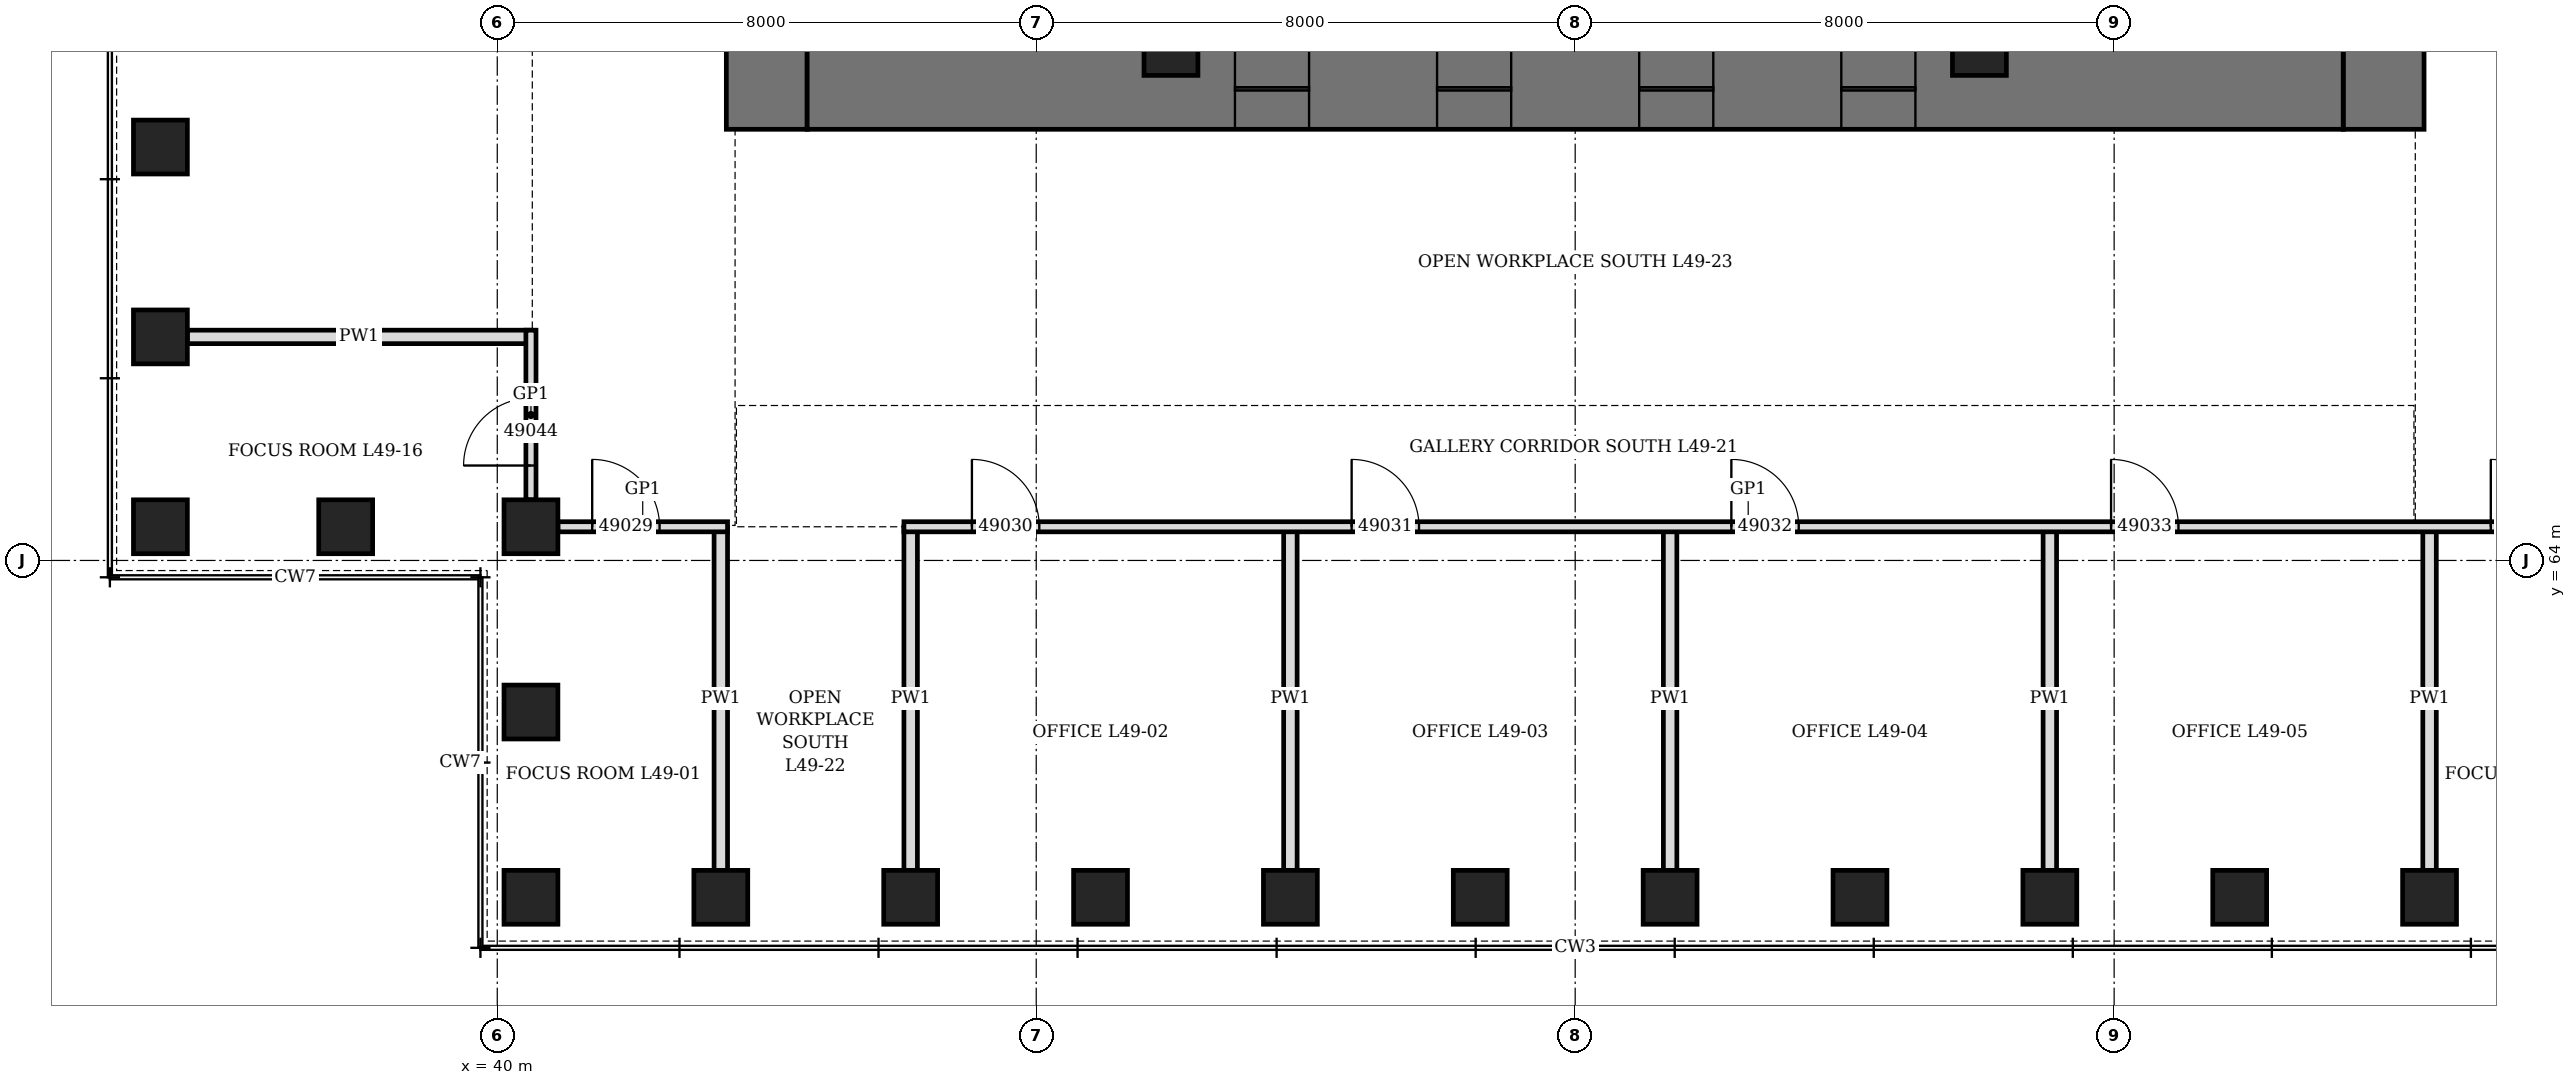
"""IFC4 building model, lengths in metres.
Left out: names, types, materials, properties, quantities, classifications, styles, units other than length and angle.
Written with IfcOpenShell. Run it as: python <this file> out.ifc"""

import sys

from ifc_helpers import new_model, si_unit, direction, frame, frame_2d, origin, origin_2d, place, context, subcontext, project, spatial, rectangle, hollow_rectangle, extrude, element, fill, save


model = new_model("IFC4")
c1 = context("Model", 3, precision=1e-05, world=origin(), true_north=direction((0.0, 1.0)))
c2 = subcontext(c1, "Body", "Model", "MODEL_VIEW")
j1 = project(units=[si_unit("LENGTHUNIT", "METRE"), si_unit("PLANEANGLEUNIT", "RADIAN")], contexts=[c1])
p1 = place(None, origin())
s1 = spatial("IfcSite", under=j1, at=p1, CompositionType="ELEMENT")
p2 = place(p1, origin())
s2 = spatial("IfcBuilding", under=s1, at=p2, CompositionType="ELEMENT")
p3 = place(p2, frame((0.0, 0.0, 219.1)))
s3 = spatial("IfcBuildingStorey", under=s2, at=p3, CompositionType="ELEMENT", Elevation=219.1)
for number, where, z_axis, x_axis in (
    (1, (40.5, 59.0, 0.0), (0.0, 0.0, 1.0), (1.0, 0.0, 0.0)),
    (2, (43.318, 59.0, 0.0), (0.0, 0.0, 1.0), (1.0, 0.0, 0.0)),
    (3, (46.136, 59.0, 0.0), (0.0, 0.0, 1.0), (1.0, 0.0, 0.0)),
    (4, (48.955, 59.0, 0.0), (0.0, 0.0, 1.0), (1.0, 0.0, 0.0)),
    (5, (51.773, 59.0, 0.0), (0.0, 0.0, 1.0), (1.0, 0.0, 0.0)),
    (6, (54.591, 59.0, 0.0), (0.0, 0.0, 1.0), (1.0, 0.0, 0.0)),
    (7, (57.409, 59.0, 0.0), (0.0, 0.0, 1.0), (1.0, 0.0, 0.0)),
    (8, (60.227, 59.0, 0.0), (0.0, 0.0, 1.0), (1.0, 0.0, 0.0)),
    (9, (63.045, 59.0, 0.0), (0.0, 0.0, 1.0), (1.0, 0.0, 0.0)),
    (10, (65.864, 59.0, 0.0), (0.0, 0.0, 1.0), (1.0, 0.0, 0.0)),
    (11, (68.682, 59.0, 0.0), (0.0, 0.0, 1.0), (1.0, 0.0, 0.0)),
    (12, (35.0, 70.136, 0.0), (0.0, 0.0, 1.0), (0.0, 1.0, 0.0)),
    (13, (35.0, 67.318, 0.0), (0.0, 0.0, 1.0), (0.0, 1.0, 0.0)),
    (14, (35.0, 64.5, 0.0), (0.0, 0.0, 1.0), (1.0, 0.0, 0.0)),
    (15, (37.75, 64.5, 0.0), (0.0, 0.0, 1.0), (1.0, 0.0, 0.0)),
    (16, (40.5, 64.5, 0.0), (0.0, 0.0, 1.0), (0.0, 1.0, 0.0)),
    (17, (40.5, 61.75, 0.0), (0.0, 0.0, 1.0), (0.0, 1.0, 0.0)),
):
    element("IfcColumn", number, at=place(p3, frame(where, z_axis=z_axis, x_axis=x_axis)), inside=s3, PredefinedType="COLUMN", context=c2, shape_type="SweptSolid", body=[
        extrude(hollow_rectangle(XDim=0.8, YDim=0.8, WallThickness=0.08, at=origin_2d()), origin(), (0.0, 0.0, 1.0), 4.2),
    ])
p4 = place(p3, frame((44.0, 70.4, 0.0), z_axis=(0.0, 0.0, 1.0), x_axis=(0.0, 1.0, 0.0)))
e18 = element("IfcWall", 18, at=p4, inside=s3, PredefinedType="SHEAR", context=c2, shape_type="SweptSolid", body=[
    extrude(rectangle(XDim=19.2, YDim=1.2, at=frame_2d((9.6, 0.0))), origin(), (0.0, 0.0, 1.0), 4.2),
])
p5 = place(p4, frame((8.6, 0.0, 0.0)))
e19 = element("IfcOpeningElement", 19, at=p5, cuts=e18, PredefinedType="OPENING", context=c2, shape_type="SweptSolid", body=[
    extrude(rectangle(XDim=2.0, YDim=2.4, at=frame_2d((1.0, 1.2))), frame((0.0, 0.61, 0.0), z_axis=(0.0, -1.0, 0.0), x_axis=(1.0, 0.0, 0.0)), (0.0, 0.0, 1.0), 1.22),
])
p6 = place(p3, frame((68.0, 70.4, 0.0), z_axis=(0.0, 0.0, 1.0), x_axis=(0.0, 1.0, 0.0)))
e20 = element("IfcWall", 20, at=p6, inside=s3, PredefinedType="SHEAR", context=c2, shape_type="SweptSolid", body=[
    extrude(rectangle(XDim=19.2, YDim=1.2, at=frame_2d((9.6, 0.0))), origin(), (0.0, 0.0, 1.0), 4.2),
])
p7 = place(p6, frame((8.6, 0.0, 0.0)))
e21 = element("IfcOpeningElement", 21, at=p7, cuts=e20, PredefinedType="OPENING", context=c2, shape_type="SweptSolid", body=[
    extrude(rectangle(XDim=2.0, YDim=2.4, at=frame_2d((1.0, 1.2))), frame((0.0, 0.61, 0.0), z_axis=(0.0, -1.0, 0.0), x_axis=(1.0, 0.0, 0.0)), (0.0, 0.0, 1.0), 1.22),
])
p8 = place(p3, frame((44.6, 71.0, 0.0), z_axis=(0.0, 0.0, 1.0), x_axis=(1.0, 0.0, 0.0)))
e22 = element("IfcWall", 22, at=p8, inside=s3, PredefinedType="SHEAR", context=c2, shape_type="SweptSolid", body=[
    extrude(rectangle(XDim=22.8, YDim=1.2, at=frame_2d((11.4, 0.0))), origin(), (0.0, 0.0, 1.0), 4.2),
])
p9 = place(p8, frame((6.35, 0.0, 0.0)))
e23 = element("IfcOpeningElement", 23, at=p9, cuts=e22, PredefinedType="OPENING", context=c2, shape_type="SweptSolid", body=[
    extrude(rectangle(XDim=1.1, YDim=2.2, at=frame_2d((0.55, 1.1))), frame((0.0, 0.61, 0.0), z_axis=(0.0, -1.0, 0.0), x_axis=(1.0, 0.0, 0.0)), (0.0, 0.0, 1.0), 1.22),
])
p10 = place(p8, frame((9.35, 0.0, 0.0)))
e24 = element("IfcOpeningElement", 24, at=p10, cuts=e22, PredefinedType="OPENING", context=c2, shape_type="SweptSolid", body=[
    extrude(rectangle(XDim=1.1, YDim=2.2, at=frame_2d((0.55, 1.1))), frame((0.0, 0.61, 0.0), z_axis=(0.0, -1.0, 0.0), x_axis=(1.0, 0.0, 0.0)), (0.0, 0.0, 1.0), 1.22),
])
p11 = place(p8, frame((12.35, 0.0, 0.0)))
e25 = element("IfcOpeningElement", 25, at=p11, cuts=e22, PredefinedType="OPENING", context=c2, shape_type="SweptSolid", body=[
    extrude(rectangle(XDim=1.1, YDim=2.2, at=frame_2d((0.55, 1.1))), frame((0.0, 0.61, 0.0), z_axis=(0.0, -1.0, 0.0), x_axis=(1.0, 0.0, 0.0)), (0.0, 0.0, 1.0), 1.22),
])
p12 = place(p8, frame((15.35, 0.0, 0.0)))
e26 = element("IfcOpeningElement", 26, at=p12, cuts=e22, PredefinedType="OPENING", context=c2, shape_type="SweptSolid", body=[
    extrude(rectangle(XDim=1.1, YDim=2.2, at=frame_2d((0.55, 1.1))), frame((0.0, 0.61, 0.0), z_axis=(0.0, -1.0, 0.0), x_axis=(1.0, 0.0, 0.0)), (0.0, 0.0, 1.0), 1.22),
])
for number, where, z_axis, x_axis in (
    (27, (50.0, 71.6, 0.0), (0.0, 0.0, 1.0), (1.0, 0.0, 0.0)),
    (28, (62.0, 71.6, 0.0), (0.0, 0.0, 1.0), (1.0, 0.0, 0.0)),
):
    element("IfcColumn", number, at=place(p3, frame(where, z_axis=z_axis, x_axis=x_axis)), inside=s3, PredefinedType="COLUMN", context=c2, shape_type="SweptSolid", body=[
        extrude(hollow_rectangle(XDim=0.8, YDim=0.8, WallThickness=0.1, at=origin_2d()), origin(), (0.0, 0.0, 1.0), 4.2),
    ])
for number, where, z_axis, x_axis in (
    (29, (43.318, 59.4, 0.0), (0.0, 0.0, 1.0), (0.0, 1.0, 0.0)),
    (30, (46.136, 59.4, 0.0), (0.0, 0.0, 1.0), (0.0, 1.0, 0.0)),
    (31, (51.773, 59.4, 0.0), (0.0, 0.0, 1.0), (0.0, 1.0, 0.0)),
    (32, (57.409, 59.4, 0.0), (0.0, 0.0, 1.0), (0.0, 1.0, 0.0)),
    (33, (63.045, 59.4, 0.0), (0.0, 0.0, 1.0), (0.0, 1.0, 0.0)),
    (34, (68.682, 59.4, 0.0), (0.0, 0.0, 1.0), (0.0, 1.0, 0.0)),
    (35, (35.4, 67.318, 0.0), (0.0, 0.0, 1.0), (1.0, 0.0, 0.0)),
):
    element("IfcWall", number, at=place(p3, frame(where, z_axis=z_axis, x_axis=x_axis)), inside=s3, PredefinedType="PARTITIONING", context=c2, shape_type="SweptSolid", body=[
        extrude(rectangle(XDim=5.1, YDim=0.2, at=frame_2d((2.55, 0.0))), origin(), (0.0, 0.0, 1.0), 3.428),
    ])
p13 = place(p3, frame((40.9, 64.5, 0.0), z_axis=(0.0, 0.0, 1.0), x_axis=(1.0, 0.0, 0.0)))
e36 = element("IfcWall", 36, at=p13, inside=s3, PredefinedType="PARTITIONING", context=c2, shape_type="SweptSolid", body=[
    extrude(rectangle(XDim=2.518, YDim=0.15, at=frame_2d((1.259, 0.0))), origin(), (0.0, 0.0, 1.0), 4.04),
])
p14 = place(p13, frame((0.509, 0.0, 0.0)))
e37 = element("IfcOpeningElement", 37, at=p14, cuts=e36, PredefinedType="OPENING", context=c2, shape_type="SweptSolid", body=[
    extrude(rectangle(XDim=1.0, YDim=2.4, at=frame_2d((0.5, 1.2))), frame((0.0, 0.085, 0.0), z_axis=(0.0, -1.0, 0.0), x_axis=(1.0, 0.0, 0.0)), (0.0, 0.0, 1.0), 0.17),
])
p15 = place(p3, frame((46.036, 64.5, 0.0), z_axis=(0.0, 0.0, 1.0), x_axis=(1.0, 0.0, 0.0)))
e38 = element("IfcWall", 38, at=p15, inside=s3, PredefinedType="PARTITIONING", context=c2, shape_type="SweptSolid", body=[
    extrude(rectangle(XDim=25.064, YDim=0.15, at=frame_2d((12.532, 0.0))), origin(), (0.0, 0.0, 1.0), 4.04),
])
p16 = place(p15, frame((1.009, 0.0, 0.0)))
e39 = element("IfcOpeningElement", 39, at=p16, cuts=e38, PredefinedType="OPENING", context=c2, shape_type="SweptSolid", body=[
    extrude(rectangle(XDim=1.0, YDim=2.1, at=frame_2d((0.5, 1.05))), frame((0.0, 0.085, 0.0), z_axis=(0.0, -1.0, 0.0), x_axis=(1.0, 0.0, 0.0)), (0.0, 0.0, 1.0), 0.17),
])
p17 = place(p15, frame((6.646, 0.0, 0.0)))
e40 = element("IfcOpeningElement", 40, at=p17, cuts=e38, PredefinedType="OPENING", context=c2, shape_type="SweptSolid", body=[
    extrude(rectangle(XDim=1.0, YDim=2.1, at=frame_2d((0.5, 1.05))), frame((0.0, 0.085, 0.0), z_axis=(0.0, -1.0, 0.0), x_axis=(1.0, 0.0, 0.0)), (0.0, 0.0, 1.0), 0.17),
])
p18 = place(p15, frame((12.282, 0.0, 0.0)))
e41 = element("IfcOpeningElement", 41, at=p18, cuts=e38, PredefinedType="OPENING", context=c2, shape_type="SweptSolid", body=[
    extrude(rectangle(XDim=1.0, YDim=2.1, at=frame_2d((0.5, 1.05))), frame((0.0, 0.085, 0.0), z_axis=(0.0, -1.0, 0.0), x_axis=(1.0, 0.0, 0.0)), (0.0, 0.0, 1.0), 0.17),
])
p19 = place(p15, frame((17.918, 0.0, 0.0)))
e42 = element("IfcOpeningElement", 42, at=p19, cuts=e38, PredefinedType="OPENING", context=c2, shape_type="SweptSolid", body=[
    extrude(rectangle(XDim=1.0, YDim=2.1, at=frame_2d((0.5, 1.05))), frame((0.0, 0.085, 0.0), z_axis=(0.0, -1.0, 0.0), x_axis=(1.0, 0.0, 0.0)), (0.0, 0.0, 1.0), 0.17),
])
p20 = place(p15, frame((23.554, 0.0, 0.0)))
e43 = element("IfcOpeningElement", 43, at=p20, cuts=e38, PredefinedType="OPENING", context=c2, shape_type="SweptSolid", body=[
    extrude(rectangle(XDim=1.0, YDim=2.4, at=frame_2d((0.5, 1.2))), frame((0.0, 0.085, 0.0), z_axis=(0.0, -1.0, 0.0), x_axis=(1.0, 0.0, 0.0)), (0.0, 0.0, 1.0), 0.17),
])
p21 = place(p3, frame((40.5, 64.9, 0.0), z_axis=(0.0, 0.0, 1.0), x_axis=(0.0, 1.0, 0.0)))
e44 = element("IfcWall", 44, at=p21, inside=s3, PredefinedType="PARTITIONING", context=c2, shape_type="SweptSolid", body=[
    extrude(rectangle(XDim=2.518, YDim=0.15, at=frame_2d((1.259, 0.0))), origin(), (0.0, 0.0, 1.0), 4.04),
])
p22 = place(p21, frame((0.509, 0.0, 0.0)))
e45 = element("IfcOpeningElement", 45, at=p22, cuts=e44, PredefinedType="OPENING", context=c2, shape_type="SweptSolid", body=[
    extrude(rectangle(XDim=1.0, YDim=2.4, at=frame_2d((0.5, 1.2))), frame((0.0, 0.085, 0.0), z_axis=(0.0, -1.0, 0.0), x_axis=(1.0, 0.0, 0.0)), (0.0, 0.0, 1.0), 0.17),
])
p23 = place(p9, origin())
e46 = element("IfcDoor", 46, at=p23, inside=s3, OperationType="SLIDING_TO_LEFT", PredefinedType="DOOR", context=c2, shape_type="SweptSolid", body=[
    extrude(rectangle(XDim=1.1, YDim=2.2, at=frame_2d((0.55, 1.1))), frame((0.0, 0.35, 0.0), z_axis=(0.0, -1.0, 0.0), x_axis=(1.0, 0.0, 0.0)), (0.0, 0.0, 1.0), 0.7),
])
fill(e23, e46)
p24 = place(p10, origin())
e47 = element("IfcDoor", 47, at=p24, inside=s3, OperationType="SLIDING_TO_LEFT", PredefinedType="DOOR", context=c2, shape_type="SweptSolid", body=[
    extrude(rectangle(XDim=1.1, YDim=2.2, at=frame_2d((0.55, 1.1))), frame((0.0, 0.35, 0.0), z_axis=(0.0, -1.0, 0.0), x_axis=(1.0, 0.0, 0.0)), (0.0, 0.0, 1.0), 0.7),
])
fill(e24, e47)
p25 = place(p11, origin())
e48 = element("IfcDoor", 48, at=p25, inside=s3, OperationType="SLIDING_TO_LEFT", PredefinedType="DOOR", context=c2, shape_type="SweptSolid", body=[
    extrude(rectangle(XDim=1.1, YDim=2.2, at=frame_2d((0.55, 1.1))), frame((0.0, 0.35, 0.0), z_axis=(0.0, -1.0, 0.0), x_axis=(1.0, 0.0, 0.0)), (0.0, 0.0, 1.0), 0.7),
])
fill(e25, e48)
p26 = place(p12, origin())
e49 = element("IfcDoor", 49, at=p26, inside=s3, OperationType="SLIDING_TO_LEFT", PredefinedType="DOOR", context=c2, shape_type="SweptSolid", body=[
    extrude(rectangle(XDim=1.1, YDim=2.2, at=frame_2d((0.55, 1.1))), frame((0.0, 0.35, 0.0), z_axis=(0.0, -1.0, 0.0), x_axis=(1.0, 0.0, 0.0)), (0.0, 0.0, 1.0), 0.7),
])
fill(e26, e49)
p27 = place(p14, origin())
e50 = element("IfcDoor", 50, at=p27, inside=s3, OperationType="SINGLE_SWING_RIGHT", PredefinedType="DOOR", context=c2, shape_type="SweptSolid", body=[
    extrude(rectangle(XDim=1.0, YDim=2.4, at=frame_2d((0.5, 1.2))), frame((0.0, 0.075, 0.0), z_axis=(0.0, -1.0, 0.0), x_axis=(1.0, 0.0, 0.0)), (0.0, 0.0, 1.0), 0.149),
])
fill(e37, e50)
p28 = place(p16, origin())
e51 = element("IfcDoor", 51, at=p28, inside=s3, OperationType="SINGLE_SWING_LEFT", PredefinedType="DOOR", context=c2, shape_type="SweptSolid", body=[
    extrude(rectangle(XDim=1.0, YDim=2.1, at=frame_2d((0.5, 1.05))), frame((0.0, 0.075, 0.0), z_axis=(0.0, -1.0, 0.0), x_axis=(1.0, 0.0, 0.0)), (0.0, 0.0, 1.0), 0.149),
])
fill(e39, e51)
p29 = place(p17, origin())
e52 = element("IfcDoor", 52, at=p29, inside=s3, OperationType="SINGLE_SWING_LEFT", PredefinedType="DOOR", context=c2, shape_type="SweptSolid", body=[
    extrude(rectangle(XDim=1.0, YDim=2.1, at=frame_2d((0.5, 1.05))), frame((0.0, 0.075, 0.0), z_axis=(0.0, -1.0, 0.0), x_axis=(1.0, 0.0, 0.0)), (0.0, 0.0, 1.0), 0.149),
])
fill(e40, e52)
p30 = place(p18, origin())
e53 = element("IfcDoor", 53, at=p30, inside=s3, OperationType="SINGLE_SWING_LEFT", PredefinedType="DOOR", context=c2, shape_type="SweptSolid", body=[
    extrude(rectangle(XDim=1.0, YDim=2.1, at=frame_2d((0.5, 1.05))), frame((0.0, 0.075, 0.0), z_axis=(0.0, -1.0, 0.0), x_axis=(1.0, 0.0, 0.0)), (0.0, 0.0, 1.0), 0.149),
])
fill(e41, e53)
p31 = place(p19, origin())
e54 = element("IfcDoor", 54, at=p31, inside=s3, OperationType="SINGLE_SWING_LEFT", PredefinedType="DOOR", context=c2, shape_type="SweptSolid", body=[
    extrude(rectangle(XDim=1.0, YDim=2.1, at=frame_2d((0.5, 1.05))), frame((0.0, 0.075, 0.0), z_axis=(0.0, -1.0, 0.0), x_axis=(1.0, 0.0, 0.0)), (0.0, 0.0, 1.0), 0.149),
])
fill(e42, e54)
p32 = place(p20, origin())
e55 = element("IfcDoor", 55, at=p32, inside=s3, OperationType="SINGLE_SWING_RIGHT", PredefinedType="DOOR", context=c2, shape_type="SweptSolid", body=[
    extrude(rectangle(XDim=1.0, YDim=2.4, at=frame_2d((0.5, 1.2))), frame((0.0, 0.075, 0.0), z_axis=(0.0, -1.0, 0.0), x_axis=(1.0, 0.0, 0.0)), (0.0, 0.0, 1.0), 0.149),
])
fill(e43, e55)
p33 = place(p22, origin())
e56 = element("IfcDoor", 56, at=p33, inside=s3, OperationType="SINGLE_SWING_RIGHT", PredefinedType="DOOR", context=c2, shape_type="SweptSolid", body=[
    extrude(rectangle(XDim=1.0, YDim=2.4, at=frame_2d((0.5, 1.2))), frame((0.0, 0.075, 0.0), z_axis=(0.0, -1.0, 0.0), x_axis=(1.0, 0.0, 0.0)), (0.0, 0.0, 1.0), 0.149),
])
fill(e45, e56)
save(model, sys.argv[1])
